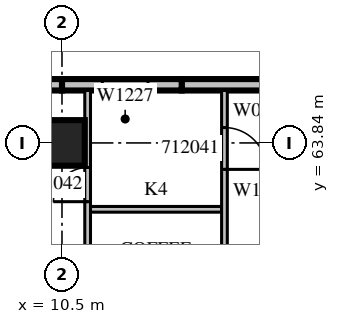
"""IFC4 building model, lengths in metres.
Left out: names, types, materials, properties, quantities, classifications, styles, units other than length and angle.
Written with IfcOpenShell. Run it as: python <this file> out.ifc"""

import sys

from ifc_helpers import new_model, si_unit, direction, frame, frame_2d, origin, origin_2d, place, context, subcontext, project, spatial, rectangle, extrude, source, transform, mapped, element, fill, save


model = new_model("IFC4")
c1 = context("Model", 3, precision=1e-05, world=origin(), true_north=direction((0.0, 1.0)))
c2 = subcontext(c1, "Body", "Model", "MODEL_VIEW")
j1 = project(units=[si_unit("LENGTHUNIT", "METRE"), si_unit("PLANEANGLEUNIT", "RADIAN")], contexts=[c1])
p1 = place(None, origin())
s1 = spatial("IfcSite", under=j1, at=p1, CompositionType="ELEMENT")
p2 = place(p1, origin())
s2 = spatial("IfcBuilding", under=s1, at=p2, CompositionType="ELEMENT")
p3 = place(p2, frame((0.0, 0.0, 61.5)))
s3 = spatial("IfcBuildingStorey", under=s2, at=p3, CompositionType="ELEMENT", Elevation=61.5)
m1 = source(origin(), c2, "Body", "SweptSolid", [
    extrude(rectangle(XDim=1.2, YDim=1.2, at=origin_2d()), origin(), (0.0, 0.0, 1.0), 4.2),
])
p4 = place(p3, frame((10.5, 63.84, 0.0), z_axis=(0.0, 0.0, 1.0), x_axis=(1.0, 0.0, 0.0)))
e1 = element("IfcColumn", 1, at=p4, inside=s3, PredefinedType="COLUMN", context=c2, shape_type="MappedRepresentation", body=[
    mapped(m1, transform((0.0, 0.0, 0.0), scale=1.0)),
])
m2 = source(origin(), c2, "Body", "SweptSolid", [
    extrude(rectangle(XDim=3.15, YDim=0.3, at=frame_2d((1.575, 0.0))), origin(), (0.0, 0.0, 1.0), 3.8),
])
p5 = place(p3, frame((16.8, 65.37, 0.0), z_axis=(0.0, 0.0, 1.0), x_axis=(-1.0, 0.0, 0.0)))
e2 = element("IfcWall", 2, at=p5, inside=s3, PredefinedType="STANDARD", context=c2, shape_type="MappedRepresentation", body=[
    mapped(m2, transform((0.0, 0.0, 0.0), scale=1.0)),
])
p6 = place(p3, frame((13.65, 65.37, 0.0), z_axis=(0.0, 0.0, 1.0), x_axis=(-1.0, 0.0, 0.0)))
e3 = element("IfcWall", 3, at=p6, inside=s3, PredefinedType="STANDARD", context=c2, shape_type="MappedRepresentation", body=[
    mapped(m2, transform((0.0, 0.0, 0.0), scale=1.0)),
])
m3 = source(origin(), c2, "Body", "SweptSolid", [
    extrude(rectangle(XDim=1.2, YDim=2.7, at=frame_2d((0.6, 1.35))), frame((0.0, 0.16, 0.0), z_axis=(0.0, -1.0, 0.0), x_axis=(1.0, 0.0, 0.0)), (0.0, 0.0, 1.0), 0.32),
])
p7 = place(p6, frame((0.887, 0.0, 0.6)))
e4 = element("IfcOpeningElement", 4, at=p7, cuts=e3, PredefinedType="OPENING", context=c2, shape_type="MappedRepresentation", body=[
    mapped(m3, transform((0.0, 0.0, 0.0), scale=1.0)),
])
m4 = source(origin(), c2, "Body", "SweptSolid", [
    extrude(rectangle(XDim=6.3, YDim=0.3, at=frame_2d((3.15, 0.0))), origin(), (0.0, 0.0, 1.0), 3.8),
])
p8 = place(p3, frame((10.5, 65.37, 0.0), z_axis=(0.0, 0.0, 1.0), x_axis=(-1.0, 0.0, 0.0)))
e5 = element("IfcWall", 5, at=p8, inside=s3, PredefinedType="STANDARD", context=c2, shape_type="MappedRepresentation", body=[
    mapped(m4, transform((0.0, 0.0, 0.0), scale=1.0)),
])
m5 = source(origin(), c2, "Body", "SweptSolid", [
    extrude(rectangle(XDim=1.8, YDim=2.7, at=frame_2d((0.9, 1.35))), frame((0.0, 0.16, 0.0), z_axis=(0.0, -1.0, 0.0), x_axis=(1.0, 0.0, 0.0)), (0.0, 0.0, 1.0), 0.32),
])
p9 = place(p8, frame((0.675, 0.0, 0.6)))
e6 = element("IfcOpeningElement", 6, at=p9, cuts=e5, PredefinedType="OPENING", context=c2, shape_type="MappedRepresentation", body=[
    mapped(m5, transform((0.0, 0.0, 0.0), scale=1.0)),
])
p10 = place(p8, frame((3.825, 0.0, 0.6)))
e7 = element("IfcOpeningElement", 7, at=p10, cuts=e5, PredefinedType="OPENING", context=c2, shape_type="MappedRepresentation", body=[
    mapped(m5, transform((0.0, 0.0, 0.0), scale=1.0)),
])
m6 = source(origin(), c2, "Body", "SweptSolid", [
    extrude(rectangle(XDim=3.45, YDim=0.15, at=frame_2d((1.725, 0.0))), origin(), (0.0, 0.0, 1.0), 3.8),
])
p11 = place(p3, frame((14.7, 62.093, 0.0), z_axis=(0.0, 0.0, 1.0), x_axis=(-1.0, 0.0, 0.0)))
e8 = element("IfcWall", 8, at=p11, inside=s3, PredefinedType="PARTITIONING", context=c2, shape_type="MappedRepresentation", body=[
    mapped(m6, transform((0.0, 0.0, 0.0), scale=1.0)),
])
m7 = source(origin(), c2, "Body", "SweptSolid", [
    extrude(rectangle(XDim=19.02, YDim=0.15, at=frame_2d((9.51, 0.0))), origin(), (0.0, 0.0, 1.0), 3.8),
])
p12 = place(p3, frame((11.175, 46.2, 0.0), z_axis=(0.0, 0.0, 1.0), x_axis=(0.0, 1.0, 0.0)))
e9 = element("IfcWall", 9, at=p12, inside=s3, PredefinedType="PARTITIONING", context=c2, shape_type="MappedRepresentation", body=[
    mapped(m7, transform((0.0, 0.0, 0.0), scale=1.0)),
])
m8 = source(origin(), c2, "Body", "SweptSolid", [
    extrude(rectangle(XDim=0.9, YDim=2.1, at=frame_2d((0.45, 1.05))), frame((0.0, 0.085, 0.0), z_axis=(0.0, -1.0, 0.0), x_axis=(1.0, 0.0, 0.0)), (0.0, 0.0, 1.0), 0.17),
])
p13 = place(p12, frame((2.487, 0.0, 0.0)))
e10 = element("IfcOpeningElement", 10, at=p13, cuts=e9, PredefinedType="OPENING", context=c2, shape_type="MappedRepresentation", body=[
    mapped(m8, transform((0.0, 0.0, 0.0), scale=1.0)),
])
p14 = place(p12, frame((8.367, 0.0, 0.0)))
e11 = element("IfcOpeningElement", 11, at=p14, cuts=e9, PredefinedType="OPENING", context=c2, shape_type="MappedRepresentation", body=[
    mapped(m8, transform((0.0, 0.0, 0.0), scale=1.0)),
])
p15 = place(p12, frame((16.094, 0.0, 0.0)))
e12 = element("IfcOpeningElement", 12, at=p15, cuts=e9, PredefinedType="OPENING", context=c2, shape_type="MappedRepresentation", body=[
    mapped(m8, transform((0.0, 0.0, 0.0), scale=1.0)),
])
p16 = place(p3, frame((14.775, 46.2, 0.0), z_axis=(0.0, 0.0, 1.0), x_axis=(0.0, 1.0, 0.0)))
e13 = element("IfcWall", 13, at=p16, inside=s3, PredefinedType="PARTITIONING", context=c2, shape_type="MappedRepresentation", body=[
    mapped(m7, transform((0.0, 0.0, 0.0), scale=1.0)),
])
m9 = source(origin(), c2, "Body", "SweptSolid", [
    extrude(rectangle(XDim=1.2, YDim=2.1, at=frame_2d((0.6, 1.05))), frame((0.0, 0.085, 0.0), z_axis=(0.0, -1.0, 0.0), x_axis=(1.0, 0.0, 0.0)), (0.0, 0.0, 1.0), 0.17),
])
p17 = place(p16, frame((5.28, 0.0, 0.0)))
e14 = element("IfcOpeningElement", 14, at=p17, cuts=e13, PredefinedType="OPENING", context=c2, shape_type="MappedRepresentation", body=[
    mapped(m9, transform((0.0, 0.0, 0.0), scale=1.0)),
])
m10 = source(origin(), c2, "Body", "SweptSolid", [
    extrude(rectangle(XDim=1.1, YDim=2.1, at=frame_2d((0.55, 1.05))), frame((0.0, 0.085, 0.0), z_axis=(0.0, -1.0, 0.0), x_axis=(1.0, 0.0, 0.0)), (0.0, 0.0, 1.0), 0.17),
])
p18 = place(p16, frame((16.944, 0.0, 0.0)))
e15 = element("IfcOpeningElement", 15, at=p18, cuts=e13, PredefinedType="OPENING", context=c2, shape_type="MappedRepresentation", body=[
    mapped(m10, transform((0.0, 0.0, 0.0), scale=1.0)),
])
p19 = place(p16, frame((13.377, 0.0, 0.0)))
e16 = element("IfcOpeningElement", 16, at=p19, cuts=e13, PredefinedType="OPENING", context=c2, shape_type="MappedRepresentation", body=[
    mapped(m8, transform((0.0, 0.0, 0.0), scale=1.0)),
])
m11 = source(origin(), c2, "Body", "SweptSolid", [
    extrude(rectangle(XDim=1.2, YDim=2.7, at=frame_2d((0.6, 1.35))), frame((0.0, 0.03, 0.0), z_axis=(0.0, -1.0, 0.0), x_axis=(1.0, 0.0, 0.0)), (0.0, 0.0, 1.0), 0.06),
])
p20 = place(p7, origin())
e17 = element("IfcWindow", 17, at=p20, inside=s3, PartitioningType="SINGLE_PANEL", PredefinedType="WINDOW", context=c2, shape_type="MappedRepresentation", body=[
    mapped(m11, transform((0.0, 0.0, 0.0), scale=1.0)),
])
fill(e4, e17)
m12 = source(origin(), c2, "Body", "SweptSolid", [
    extrude(rectangle(XDim=1.1, YDim=2.1, at=frame_2d((0.55, 1.05))), frame((0.0, 0.025, 0.0), z_axis=(0.0, -1.0, 0.0), x_axis=(1.0, 0.0, 0.0)), (0.0, 0.0, 1.0), 0.05),
])
p21 = place(p18, origin())
e18 = element("IfcDoor", 18, at=p21, inside=s3, OperationType="SINGLE_SWING_RIGHT", PredefinedType="DOOR", context=c2, shape_type="MappedRepresentation", body=[
    mapped(m12, transform((0.0, 0.0, 0.0), scale=1.0)),
])
fill(e15, e18)
m13 = source(origin(), c2, "Body", "SweptSolid", [
    extrude(rectangle(XDim=0.9, YDim=2.1, at=frame_2d((0.45, 1.05))), frame((0.0, 0.025, 0.0), z_axis=(0.0, -1.0, 0.0), x_axis=(1.0, 0.0, 0.0)), (0.0, 0.0, 1.0), 0.05),
])
p22 = place(p15, origin())
e19 = element("IfcDoor", 19, at=p22, inside=s3, OperationType="SINGLE_SWING_LEFT", PredefinedType="DOOR", context=c2, shape_type="MappedRepresentation", body=[
    mapped(m13, transform((0.0, 0.0, 0.0), scale=1.0)),
])
fill(e12, e19)
save(model, sys.argv[1])
